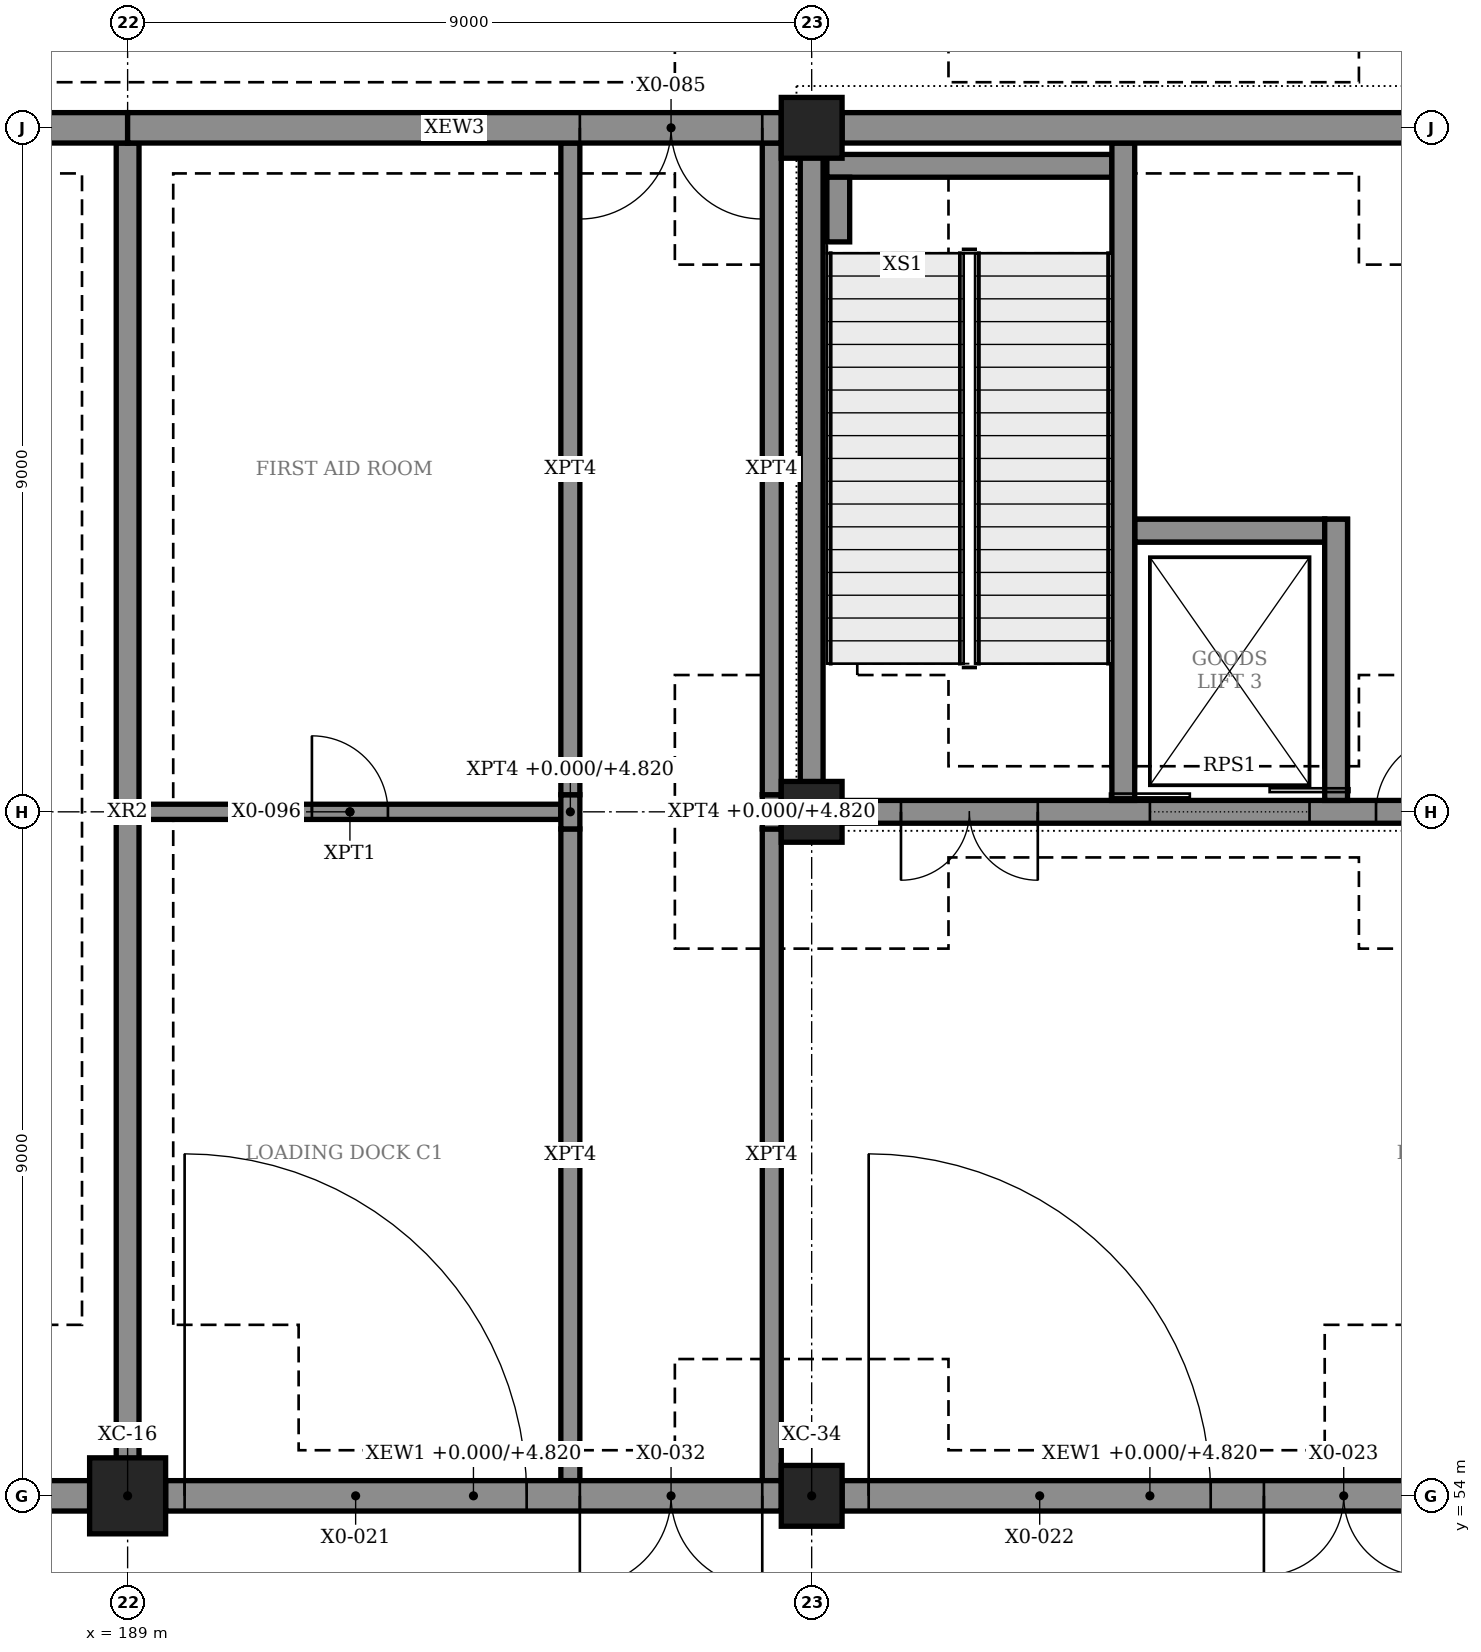
"""IFC4 building model, lengths in metres.
Left out: names, types, materials, properties, quantities, classifications, styles, units other than length and angle.
Written with IfcOpenShell. Run it as: python <this file> out.ifc"""

import sys

from ifc_helpers import new_model, si_unit, direction, frame, frame_2d, origin, origin_2d, place, context, subcontext, project, spatial, rectangle, hollow_rectangle, extrude, element, fill, save


model = new_model("IFC4")
c1 = context("Model", 3, precision=1e-05, world=origin(), true_north=direction((0.0, 1.0)))
c2 = subcontext(c1, "Body", "Model", "MODEL_VIEW")
j1 = project(units=[si_unit("LENGTHUNIT", "METRE"), si_unit("PLANEANGLEUNIT", "RADIAN")], contexts=[c1])
p1 = place(None, origin())
s1 = spatial("IfcSite", under=j1, at=p1, CompositionType="ELEMENT")
p2 = place(p1, origin())
s2 = spatial("IfcBuilding", under=s1, at=p2, CompositionType="ELEMENT")
p3 = place(p2, origin())
s3 = spatial("IfcBuildingStorey", under=s2, at=p3, CompositionType="ELEMENT", Elevation=0.0)
p4 = place(p3, frame((189.0, 54.0, 0.0), z_axis=(0.0, 0.0, 1.0), x_axis=(1.0, 0.0, 0.0)))
e1 = element("IfcColumn", 1, at=p4, inside=s3, PredefinedType="COLUMN", context=c2, shape_type="SweptSolid", body=[
    extrude(hollow_rectangle(XDim=1.0, YDim=1.0, WallThickness=0.032, at=origin_2d()), origin(), (0.0, 0.0, 1.0), 6.0),
])
for number, where, z_axis, x_axis in (
    (2, (198.0, 54.0, 0.0), (0.0, 0.0, 1.0), (1.0, 0.0, 0.0)),
    (3, (198.0, 63.0, 0.0), (0.0, 0.0, 1.0), (1.0, 0.0, 0.0)),
    (4, (198.0, 72.0, 0.0), (0.0, 0.0, 1.0), (1.0, 0.0, 0.0)),
):
    element("IfcColumn", number, at=place(p3, frame(where, z_axis=z_axis, x_axis=x_axis)), inside=s3, PredefinedType="COLUMN", context=c2, shape_type="SweptSolid", body=[
        extrude(rectangle(XDim=0.8, YDim=0.8, at=origin_2d()), origin(), (0.0, 0.0, 1.0), 6.0),
    ])
p5 = place(p3, frame((197.85, 63.0, 0.0), z_axis=(0.0, 0.0, 1.0), x_axis=(1.0, 0.0, 0.0)))
e5 = element("IfcWall", 5, at=p5, inside=s3, PredefinedType="SHEAR", context=c2, shape_type="SweptSolid", body=[
    extrude(rectangle(XDim=9.3, YDim=0.3, at=frame_2d((4.65, 0.0))), origin(), (0.0, 0.0, 1.0), 6.0),
])
p6 = place(p5, frame((1.325, 0.0, 0.0)))
e6 = element("IfcOpeningElement", 6, at=p6, cuts=e5, PredefinedType="OPENING", context=c2, shape_type="SweptSolid", body=[
    extrude(rectangle(XDim=1.8, YDim=2.4, at=frame_2d((0.9, 1.2))), frame((0.0, 0.16, 0.0), z_axis=(0.0, -1.0, 0.0), x_axis=(1.0, 0.0, 0.0)), (0.0, 0.0, 1.0), 0.32),
])
p7 = place(p5, frame((4.6, 0.0, 0.0)))
e7 = element("IfcOpeningElement", 7, at=p7, cuts=e5, PredefinedType="OPENING", context=c2, shape_type="SweptSolid", body=[
    extrude(rectangle(XDim=2.1, YDim=2.4, at=frame_2d((1.05, 1.2))), frame((0.0, 0.16, 0.0), z_axis=(0.0, -1.0, 0.0), x_axis=(1.0, 0.0, 0.0)), (0.0, 0.0, 1.0), 0.32),
])
p8 = place(p5, frame((7.575, 0.0, 0.0)))
e8 = element("IfcOpeningElement", 8, at=p8, cuts=e5, PredefinedType="OPENING", context=c2, shape_type="SweptSolid", body=[
    extrude(rectangle(XDim=1.0, YDim=2.4, at=frame_2d((0.5, 1.2))), frame((0.0, 0.16, 0.0), z_axis=(0.0, -1.0, 0.0), x_axis=(1.0, 0.0, 0.0)), (0.0, 0.0, 1.0), 0.32),
])
p9 = place(p3, frame((198.0, 63.15, 0.0), z_axis=(0.0, 0.0, 1.0), x_axis=(0.0, 1.0, 0.0)))
e9 = element("IfcWall", 9, at=p9, inside=s3, PredefinedType="SHEAR", context=c2, shape_type="SweptSolid", body=[
    extrude(rectangle(XDim=8.65, YDim=0.3, at=frame_2d((4.325, 0.0))), origin(), (0.0, 0.0, 1.0), 6.0),
])
p10 = place(p3, frame((189.0, 54.2, 0.0), z_axis=(0.0, 0.0, 1.0), x_axis=(0.0, 1.0, 0.0)))
e10 = element("IfcWall", 10, at=p10, inside=s3, PredefinedType="SOLIDWALL", context=c2, shape_type="SweptSolid", body=[
    extrude(rectangle(XDim=17.6, YDim=0.3, at=frame_2d((8.8, 0.0))), origin(), (0.0, 0.0, 1.0), 5.72),
])
p11 = place(p3, frame((180.0, 54.0, 0.0), z_axis=(0.0, 0.0, 1.0), x_axis=(1.0, 0.0, 0.0)))
e11 = element("IfcWall", 11, at=p11, inside=s3, PredefinedType="SOLIDWALL", context=c2, shape_type="SweptSolid", body=[
    extrude(rectangle(XDim=8.5, YDim=0.4, at=frame_2d((4.25, 0.0))), origin(), (0.0, 0.0, 1.0), 5.3),
])
p12 = place(p11, frame((1.9, 0.0, 0.0)))
e12 = element("IfcOpeningElement", 12, at=p12, cuts=e11, PredefinedType="OPENING", context=c2, shape_type="SweptSolid", body=[
    extrude(rectangle(XDim=5.2, YDim=5.2, at=frame_2d((2.6, 2.6))), frame((0.0, 0.21, 0.0), z_axis=(0.0, -1.0, 0.0), x_axis=(1.0, 0.0, 0.0)), (0.0, 0.0, 1.0), 0.42),
])
p13 = place(p3, frame((189.5, 54.0, 0.0), z_axis=(0.0, 0.0, 1.0), x_axis=(1.0, 0.0, 0.0)))
e13 = element("IfcWall", 13, at=p13, inside=s3, PredefinedType="SOLIDWALL", context=c2, shape_type="SweptSolid", body=[
    extrude(rectangle(XDim=8.1, YDim=0.4, at=frame_2d((4.05, 0.0))), origin(), (0.0, 0.0, 1.0), 4.82),
])
p14 = place(p13, frame((0.25, 0.0, 0.0)))
e14 = element("IfcOpeningElement", 14, at=p14, cuts=e13, PredefinedType="OPENING", context=c2, shape_type="SweptSolid", body=[
    extrude(rectangle(XDim=4.5, YDim=4.5, at=frame_2d((2.25, 2.25))), frame((0.0, 0.21, 0.0), z_axis=(0.0, -1.0, 0.0), x_axis=(1.0, 0.0, 0.0)), (0.0, 0.0, 1.0), 0.42),
])
p15 = place(p13, frame((5.45, 0.0, 0.0)))
e15 = element("IfcOpeningElement", 15, at=p15, cuts=e13, PredefinedType="OPENING", context=c2, shape_type="SweptSolid", body=[
    extrude(rectangle(XDim=2.4, YDim=2.4, at=frame_2d((1.2, 1.2))), frame((0.0, 0.21, 0.0), z_axis=(0.0, -1.0, 0.0), x_axis=(1.0, 0.0, 0.0)), (0.0, 0.0, 1.0), 0.42),
])
p16 = place(p3, frame((198.4, 54.0, 0.0), z_axis=(0.0, 0.0, 1.0), x_axis=(1.0, 0.0, 0.0)))
e16 = element("IfcWall", 16, at=p16, inside=s3, PredefinedType="SOLIDWALL", context=c2, shape_type="SweptSolid", body=[
    extrude(rectangle(XDim=8.1, YDim=0.4, at=frame_2d((4.05, 0.0))), origin(), (0.0, 0.0, 1.0), 4.82),
])
p17 = place(p16, frame((0.35, 0.0, 0.0)))
e17 = element("IfcOpeningElement", 17, at=p17, cuts=e16, PredefinedType="OPENING", context=c2, shape_type="SweptSolid", body=[
    extrude(rectangle(XDim=4.5, YDim=4.5, at=frame_2d((2.25, 2.25))), frame((0.0, 0.21, 0.0), z_axis=(0.0, -1.0, 0.0), x_axis=(1.0, 0.0, 0.0)), (0.0, 0.0, 1.0), 0.42),
])
p18 = place(p16, frame((5.55, 0.0, 0.0)))
e18 = element("IfcOpeningElement", 18, at=p18, cuts=e16, PredefinedType="OPENING", context=c2, shape_type="SweptSolid", body=[
    extrude(rectangle(XDim=2.1, YDim=2.4, at=frame_2d((1.05, 1.2))), frame((0.0, 0.21, 0.0), z_axis=(0.0, -1.0, 0.0), x_axis=(1.0, 0.0, 0.0)), (0.0, 0.0, 1.0), 0.42),
])
p19 = place(p3, frame((180.0, 72.0, 0.0), z_axis=(0.0, 0.0, 1.0), x_axis=(1.0, 0.0, 0.0)))
e19 = element("IfcWall", 19, at=p19, inside=s3, PredefinedType="SOLIDWALL", context=c2, shape_type="SweptSolid", body=[
    extrude(rectangle(XDim=9.0, YDim=0.4, at=frame_2d((4.5, 0.0))), origin(), (0.0, 0.0, 1.0), 5.3),
])
p20 = place(p19, frame((1.9, 0.0, 0.0)))
e20 = element("IfcOpeningElement", 20, at=p20, cuts=e19, PredefinedType="OPENING", context=c2, shape_type="SweptSolid", body=[
    extrude(rectangle(XDim=5.2, YDim=5.2, at=frame_2d((2.6, 2.6))), frame((0.0, 0.21, 0.0), z_axis=(0.0, -1.0, 0.0), x_axis=(1.0, 0.0, 0.0)), (0.0, 0.0, 1.0), 0.42),
])
p21 = place(p3, frame((189.0, 72.0, 0.0), z_axis=(0.0, 0.0, 1.0), x_axis=(1.0, 0.0, 0.0)))
e21 = element("IfcWall", 21, at=p21, inside=s3, PredefinedType="SOLIDWALL", context=c2, shape_type="SweptSolid", body=[
    extrude(rectangle(XDim=8.6, YDim=0.4, at=frame_2d((4.3, 0.0))), origin(), (0.0, 0.0, 1.0), 4.82),
])
p22 = place(p21, frame((5.95, 0.0, 0.0)))
e22 = element("IfcOpeningElement", 22, at=p22, cuts=e21, PredefinedType="OPENING", context=c2, shape_type="SweptSolid", body=[
    extrude(rectangle(XDim=2.4, YDim=2.4, at=frame_2d((1.2, 1.2))), frame((0.0, 0.21, 0.0), z_axis=(0.0, -1.0, 0.0), x_axis=(1.0, 0.0, 0.0)), (0.0, 0.0, 1.0), 0.42),
])
p23 = place(p3, frame((198.4, 72.0, 0.0), z_axis=(0.0, 0.0, 1.0), x_axis=(1.0, 0.0, 0.0)))
e23 = element("IfcWall", 23, at=p23, inside=s3, PredefinedType="SOLIDWALL", context=c2, shape_type="SweptSolid", body=[
    extrude(rectangle(XDim=8.2, YDim=0.4, at=frame_2d((4.1, 0.0))), origin(), (0.0, 0.0, 1.0), 4.82),
])
p24 = place(p3, frame((198.2, 71.5, 0.0), z_axis=(0.0, 0.0, 1.0), x_axis=(1.0, 0.0, 0.0)))
e24 = element("IfcWall", 24, at=p24, inside=s3, PredefinedType="SHEAR", context=c2, shape_type="SweptSolid", body=[
    extrude(rectangle(XDim=3.75, YDim=0.3, at=frame_2d((1.875, 0.0))), origin(), (0.0, 0.0, 1.0), 2.8),
])
p25 = place(p3, frame((198.35, 70.499, 0.0), z_axis=(0.0, 0.0, 1.0), x_axis=(0.0, 1.0, 0.0)))
e25 = element("IfcWall", 25, at=p25, inside=s3, PredefinedType="SHEAR", context=c2, shape_type="SweptSolid", body=[
    extrude(rectangle(XDim=0.851, YDim=0.3, at=frame_2d((0.425, 0.0))), origin(), (0.0, 0.0, 1.0), 2.8),
])
p26 = place(p3, frame((202.1, 63.15, 0.0), z_axis=(0.0, 0.0, 1.0), x_axis=(0.0, 1.0, 0.0)))
e26 = element("IfcWall", 26, at=p26, inside=s3, PredefinedType="SHEAR", context=c2, shape_type="SweptSolid", body=[
    extrude(rectangle(XDim=8.65, YDim=0.3, at=frame_2d((4.325, 0.0))), origin(), (0.0, 0.0, 1.0), 5.72),
])
p27 = place(p3, frame((204.9, 63.15, 0.0), z_axis=(0.0, 0.0, 1.0), x_axis=(0.0, 1.0, 0.0)))
e27 = element("IfcWall", 27, at=p27, inside=s3, PredefinedType="SHEAR", context=c2, shape_type="SweptSolid", body=[
    extrude(rectangle(XDim=3.7, YDim=0.3, at=frame_2d((1.85, 0.0))), origin(), (0.0, 0.0, 1.0), 5.72),
])
p28 = place(p3, frame((202.25, 66.7, 0.0), z_axis=(0.0, 0.0, 1.0), x_axis=(1.0, 0.0, 0.0)))
e28 = element("IfcWall", 28, at=p28, inside=s3, PredefinedType="SHEAR", context=c2, shape_type="SweptSolid", body=[
    extrude(rectangle(XDim=2.5, YDim=0.3, at=frame_2d((1.25, 0.0))), origin(), (0.0, 0.0, 1.0), 5.72),
])
for number, where, z_axis, x_axis in (
    (29, (202.1, 63.6, -1.4), (0.0, 0.0, 1.0), (0.0, 1.0, 0.0)),
    (30, (204.9, 63.6, -1.4), (0.0, 0.0, 1.0), (0.0, 1.0, 0.0)),
):
    element("IfcWall", number, at=place(p3, frame(where, z_axis=z_axis, x_axis=x_axis)), inside=s3, PredefinedType="SHEAR", context=c2, shape_type="SweptSolid", body=[
        extrude(rectangle(XDim=3.25, YDim=0.3, at=frame_2d((1.625, 0.0))), origin(), (0.0, 0.0, 1.0), 1.4),
    ])
p29 = place(p3, frame((202.25, 66.7, -1.4), z_axis=(0.0, 0.0, 1.0), x_axis=(1.0, 0.0, 0.0)))
e31 = element("IfcWall", 31, at=p29, inside=s3, PredefinedType="SHEAR", context=c2, shape_type="SweptSolid", body=[
    extrude(rectangle(XDim=2.5, YDim=0.3, at=frame_2d((1.25, 0.0))), origin(), (0.0, 0.0, 1.0), 1.4),
])
p30 = place(p3, frame((189.15, 63.0, 0.0), z_axis=(0.0, 0.0, 1.0), x_axis=(1.0, 0.0, 0.0)))
e32 = element("IfcWall", 32, at=p30, inside=s3, PredefinedType="PARTITIONING", context=c2, shape_type="SweptSolid", body=[
    extrude(rectangle(XDim=5.55, YDim=0.2, at=frame_2d((2.775, 0.0))), origin(), (0.0, 0.0, 1.0), 4.82),
])
p31 = place(p30, frame((2.275, 0.0, 0.015)))
e33 = element("IfcOpeningElement", 33, at=p31, cuts=e32, PredefinedType="OPENING", context=c2, shape_type="SweptSolid", body=[
    extrude(rectangle(XDim=1.0, YDim=2.4, at=frame_2d((0.5, 1.2))), frame((0.0, 0.11, 0.0), z_axis=(0.0, -1.0, 0.0), x_axis=(1.0, 0.0, 0.0)), (0.0, 0.0, 1.0), 0.22),
])
p32 = place(p3, frame((194.825, 54.2, 0.0), z_axis=(0.0, 0.0, 1.0), x_axis=(0.0, 1.0, 0.0)))
e34 = element("IfcWall", 34, at=p32, inside=s3, PredefinedType="PARTITIONING", context=c2, shape_type="SweptSolid", body=[
    extrude(rectangle(XDim=8.575, YDim=0.25, at=frame_2d((4.288, 0.0))), origin(), (0.0, 0.0, 1.0), 5.72),
])
p33 = place(p3, frame((194.825, 62.775, 0.0), z_axis=(0.0, 0.0, 1.0), x_axis=(0.0, 1.0, 0.0)))
e35 = element("IfcWall", 35, at=p33, inside=s3, PredefinedType="PARTITIONING", context=c2, shape_type="SweptSolid", body=[
    extrude(rectangle(XDim=0.45, YDim=0.25, at=frame_2d((0.225, 0.0))), origin(), (0.0, 0.0, 1.0), 4.82),
])
for number, where, z_axis, x_axis in (
    (36, (194.825, 63.225, 0.0), (0.0, 0.0, 1.0), (0.0, 1.0, 0.0)),
    (37, (197.475, 54.2, 0.0), (0.0, 0.0, 1.0), (0.0, 1.0, 0.0)),
):
    element("IfcWall", number, at=place(p3, frame(where, z_axis=z_axis, x_axis=x_axis)), inside=s3, PredefinedType="PARTITIONING", context=c2, shape_type="SweptSolid", body=[
        extrude(rectangle(XDim=8.575, YDim=0.25, at=frame_2d((4.288, 0.0))), origin(), (0.0, 0.0, 1.0), 5.72),
    ])
p34 = place(p3, frame((197.475, 62.775, 0.0), z_axis=(0.0, 0.0, 1.0), x_axis=(0.0, 1.0, 0.0)))
e38 = element("IfcWall", 38, at=p34, inside=s3, PredefinedType="PARTITIONING", context=c2, shape_type="SweptSolid", body=[
    extrude(rectangle(XDim=0.45, YDim=0.25, at=frame_2d((0.225, 0.0))), origin(), (0.0, 0.0, 1.0), 4.82),
])
p35 = place(p3, frame((197.475, 63.225, 0.0), z_axis=(0.0, 0.0, 1.0), x_axis=(0.0, 1.0, 0.0)))
e39 = element("IfcWall", 39, at=p35, inside=s3, PredefinedType="PARTITIONING", context=c2, shape_type="SweptSolid", body=[
    extrude(rectangle(XDim=8.575, YDim=0.25, at=frame_2d((4.288, 0.0))), origin(), (0.0, 0.0, 1.0), 5.72),
])
p36 = place(p14, origin())
e40 = element("IfcDoor", 40, at=p36, inside=s3, OperationType="ROLLINGUP", PredefinedType="DOOR", context=c2, shape_type="SweptSolid", body=[
    extrude(rectangle(XDim=4.5, YDim=4.5, at=frame_2d((2.25, 2.25))), frame((0.0, 0.025, 0.0), z_axis=(0.0, -1.0, 0.0), x_axis=(1.0, 0.0, 0.0)), (0.0, 0.0, 1.0), 0.05),
])
fill(e14, e40)
p37 = place(p17, origin())
e41 = element("IfcDoor", 41, at=p37, inside=s3, OperationType="ROLLINGUP", PredefinedType="DOOR", context=c2, shape_type="SweptSolid", body=[
    extrude(rectangle(XDim=4.5, YDim=4.5, at=frame_2d((2.25, 2.25))), frame((0.0, 0.025, 0.0), z_axis=(0.0, -1.0, 0.0), x_axis=(1.0, 0.0, 0.0)), (0.0, 0.0, 1.0), 0.05),
])
fill(e17, e41)
p38 = place(p18, frame((2.1, 0.0, 0.0), z_axis=(0.0, 0.0, 1.0), x_axis=(-1.0, 0.0, 0.0)))
e42 = element("IfcDoor", 42, at=p38, inside=s3, OperationType="DOUBLE_DOOR_SINGLE_SWING", PredefinedType="DOOR", context=c2, shape_type="SweptSolid", body=[
    extrude(rectangle(XDim=2.1, YDim=2.4, at=frame_2d((1.05, 1.2))), frame((0.0, 0.025, 0.0), z_axis=(0.0, -1.0, 0.0), x_axis=(1.0, 0.0, 0.0)), (0.0, 0.0, 1.0), 0.05),
])
fill(e18, e42)
p39 = place(p15, frame((2.4, 0.0, 0.0), z_axis=(0.0, 0.0, 1.0), x_axis=(-1.0, 0.0, 0.0)))
e43 = element("IfcDoor", 43, at=p39, inside=s3, OperationType="DOUBLE_DOOR_SINGLE_SWING", PredefinedType="DOOR", context=c2, shape_type="SweptSolid", body=[
    extrude(rectangle(XDim=2.4, YDim=2.4, at=frame_2d((1.2, 1.2))), frame((0.0, 0.025, 0.0), z_axis=(0.0, -1.0, 0.0), x_axis=(1.0, 0.0, 0.0)), (0.0, 0.0, 1.0), 0.05),
])
fill(e15, e43)
p40 = place(p22, frame((2.4, 0.0, 0.0), z_axis=(0.0, 0.0, 1.0), x_axis=(-1.0, 0.0, 0.0)))
e44 = element("IfcDoor", 44, at=p40, inside=s3, OperationType="DOUBLE_DOOR_SINGLE_SWING", PredefinedType="DOOR", context=c2, shape_type="SweptSolid", body=[
    extrude(rectangle(XDim=2.4, YDim=2.4, at=frame_2d((1.2, 1.2))), frame((0.0, 0.025, 0.0), z_axis=(0.0, -1.0, 0.0), x_axis=(1.0, 0.0, 0.0)), (0.0, 0.0, 1.0), 0.05),
])
fill(e22, e44)
p41 = place(p31, origin())
e45 = element("IfcDoor", 45, at=p41, inside=s3, OperationType="SINGLE_SWING_LEFT", PredefinedType="DOOR", context=c2, shape_type="SweptSolid", body=[
    extrude(rectangle(XDim=1.0, YDim=2.4, at=frame_2d((0.5, 1.2))), frame((0.0, 0.025, 0.0), z_axis=(0.0, -1.0, 0.0), x_axis=(1.0, 0.0, 0.0)), (0.0, 0.0, 1.0), 0.05),
])
fill(e33, e45)
p42 = place(p6, frame((1.8, 0.0, 0.0), z_axis=(0.0, 0.0, 1.0), x_axis=(-1.0, 0.0, 0.0)))
e46 = element("IfcDoor", 46, at=p42, inside=s3, OperationType="DOUBLE_DOOR_SINGLE_SWING", PredefinedType="DOOR", context=c2, shape_type="SweptSolid", body=[
    extrude(rectangle(XDim=1.8, YDim=2.4, at=frame_2d((0.9, 1.2))), frame((0.0, 0.025, 0.0), z_axis=(0.0, -1.0, 0.0), x_axis=(1.0, 0.0, 0.0)), (0.0, 0.0, 1.0), 0.05),
])
fill(e6, e46)
p43 = place(p7, origin())
e47 = element("IfcDoor", 47, at=p43, inside=s3, OperationType="DOUBLE_DOOR_SLIDING", PredefinedType="DOOR", context=c2, shape_type="SweptSolid", body=[
    extrude(rectangle(XDim=2.1, YDim=2.4, at=frame_2d((1.05, 1.2))), frame((0.0, 0.025, 0.0), z_axis=(0.0, -1.0, 0.0), x_axis=(1.0, 0.0, 0.0)), (0.0, 0.0, 1.0), 0.05),
])
fill(e7, e47)
p44 = place(p8, origin())
e48 = element("IfcDoor", 48, at=p44, inside=s3, OperationType="SINGLE_SWING_RIGHT", PredefinedType="DOOR", context=c2, shape_type="SweptSolid", body=[
    extrude(rectangle(XDim=1.0, YDim=2.4, at=frame_2d((0.5, 1.2))), frame((0.0, 0.025, 0.0), z_axis=(0.0, -1.0, 0.0), x_axis=(1.0, 0.0, 0.0)), (0.0, 0.0, 1.0), 0.05),
])
fill(e8, e48)
save(model, sys.argv[1])
